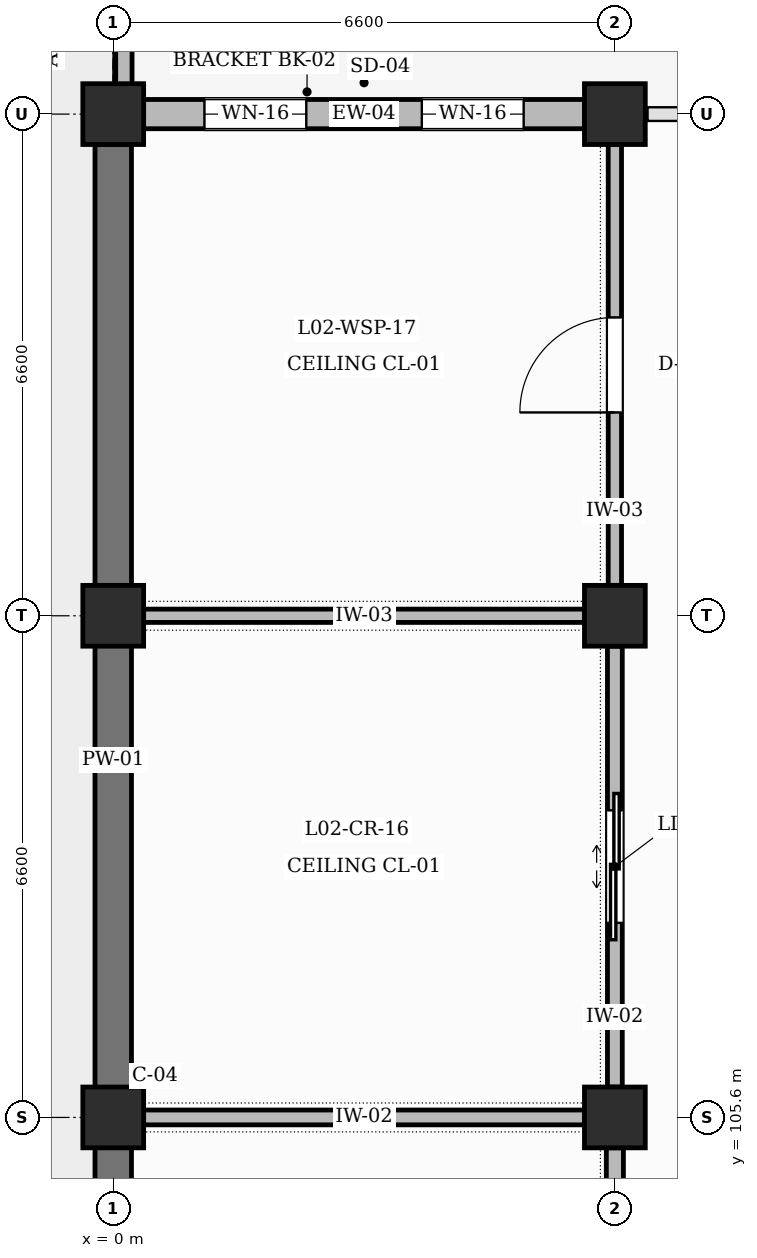
"""IFC4 building model, lengths in metres.
Left out: names, types, materials, properties, quantities, classifications, styles, units other than length and angle.
Written with IfcOpenShell. Run it as: python <this file> out.ifc"""

import sys

from ifc_helpers import new_model, si_unit, direction, frame, frame_2d, origin, origin_2d, place, context, subcontext, project, spatial, rectangle, extrude, element, fill, save


model = new_model("IFC4")
c1 = context("Model", 3, precision=1e-05, world=origin(), true_north=direction((0.0, 1.0)))
c2 = subcontext(c1, "Body", "Model", "MODEL_VIEW")
j1 = project(units=[si_unit("LENGTHUNIT", "METRE"), si_unit("PLANEANGLEUNIT", "RADIAN")], contexts=[c1])
p1 = place(None, origin())
s1 = spatial("IfcSite", under=j1, at=p1, CompositionType="ELEMENT")
p2 = place(p1, origin())
s2 = spatial("IfcBuilding", under=s1, at=p2, CompositionType="ELEMENT")
p3 = place(p2, frame((0.0, 0.0, 10.2)))
s3 = spatial("IfcBuildingStorey", under=s2, at=p3, CompositionType="ELEMENT", Elevation=10.2)
for number, where, z_axis, x_axis in (
    (1, (0.0, 105.6, 0.0), (0.0, 0.0, 1.0), (1.0, 0.0, 0.0)),
    (2, (0.0, 112.2, 0.0), (0.0, 0.0, 1.0), (1.0, 0.0, 0.0)),
    (3, (0.0, 118.8, 0.0), (0.0, 0.0, 1.0), (1.0, 0.0, 0.0)),
    (4, (6.6, 105.6, 0.0), (0.0, 0.0, 1.0), (1.0, 0.0, 0.0)),
    (5, (6.6, 112.2, 0.0), (0.0, 0.0, 1.0), (1.0, 0.0, 0.0)),
    (6, (6.6, 118.8, 0.0), (0.0, 0.0, 1.0), (1.0, 0.0, 0.0)),
):
    element("IfcColumn", number, at=place(p3, frame(where, z_axis=z_axis, x_axis=x_axis)), inside=s3, PredefinedType="COLUMN", context=c2, shape_type="SweptSolid", body=[
        extrude(rectangle(XDim=0.8, YDim=0.8, at=origin_2d()), origin(), (0.0, 0.0, 1.0), 4.2),
    ])
for number, where, z_axis, x_axis in (
    (7, (0.0, 99.4, 0.0), (0.0, 0.0, 1.0), (0.0, 1.0, 0.0)),
    (8, (0.0, 106.0, 0.0), (0.0, 0.0, 1.0), (0.0, 1.0, 0.0)),
):
    element("IfcWall", number, at=place(p3, frame(where, z_axis=z_axis, x_axis=x_axis)), inside=s3, PredefinedType="SOLIDWALL", context=c2, shape_type="SweptSolid", body=[
        extrude(rectangle(XDim=5.8, YDim=0.48, at=frame_2d((2.9, 0.0))), origin(), (0.0, 0.0, 1.0), 3.25),
    ])
p4 = place(p3, frame((0.4, 118.8, 0.0), z_axis=(0.0, 0.0, 1.0), x_axis=(1.0, 0.0, 0.0)))
e9 = element("IfcWall", 9, at=p4, inside=s3, PredefinedType="SOLIDWALL", context=c2, shape_type="SweptSolid", body=[
    extrude(rectangle(XDim=5.8, YDim=0.385, at=frame_2d((2.9, 0.0))), origin(), (0.0, 0.0, 1.0), 3.25),
])
p5 = place(p4, frame((0.8, 0.0, 0.95)))
e10 = element("IfcOpeningElement", 10, at=p5, cuts=e9, PredefinedType="OPENING", context=c2, shape_type="SweptSolid", body=[
    extrude(rectangle(XDim=1.34, YDim=1.96, at=frame_2d((0.67, 0.98))), frame((0.0, 0.202, 0.0), z_axis=(0.0, -1.0, 0.0), x_axis=(1.0, 0.0, 0.0)), (0.0, 0.0, 1.0), 0.405),
])
p6 = place(p4, frame((3.66, 0.0, 0.95)))
e11 = element("IfcOpeningElement", 11, at=p6, cuts=e9, PredefinedType="OPENING", context=c2, shape_type="SweptSolid", body=[
    extrude(rectangle(XDim=1.34, YDim=1.96, at=frame_2d((0.67, 0.98))), frame((0.0, 0.202, 0.0), z_axis=(0.0, -1.0, 0.0), x_axis=(1.0, 0.0, 0.0)), (0.0, 0.0, 1.0), 0.405),
])
p7 = place(p3, frame((0.0, 112.6, 0.0), z_axis=(0.0, 0.0, 1.0), x_axis=(0.0, 1.0, 0.0)))
e12 = element("IfcWall", 12, at=p7, inside=s3, PredefinedType="SOLIDWALL", context=c2, shape_type="SweptSolid", body=[
    extrude(rectangle(XDim=5.8, YDim=0.48, at=frame_2d((2.9, 0.0))), origin(), (0.0, 0.0, 1.0), 3.25),
])
p8 = place(p3, frame((0.14, 119.1, 0.0), z_axis=(0.0, 0.0, 1.0), x_axis=(0.0, 1.0, 0.0)))
e13 = element("IfcWall", 13, at=p8, inside=s3, PredefinedType="PARAPET", context=c2, shape_type="SweptSolid", body=[
    extrude(rectangle(XDim=6.0, YDim=0.215, at=frame_2d((3.0, 0.0))), origin(), (0.0, 0.0, 1.0), 1.15),
])
p9 = place(p3, frame((6.6, 99.4, 0.0), z_axis=(0.0, 0.0, 1.0), x_axis=(0.0, 1.0, 0.0)))
e14 = element("IfcWall", 14, at=p9, inside=s3, PredefinedType="PARTITIONING", context=c2, shape_type="SweptSolid", body=[
    extrude(rectangle(XDim=5.8, YDim=0.225, at=frame_2d((2.9, 0.0))), origin(), (0.0, 0.0, 1.0), 3.1),
])
p10 = place(p9, frame((2.24, 0.0, 0.0)))
e15 = element("IfcOpeningElement", 15, at=p10, cuts=e14, PredefinedType="OPENING", context=c2, shape_type="SweptSolid", body=[
    extrude(rectangle(XDim=1.32, YDim=2.2, at=frame_2d((0.66, 1.1))), frame((0.0, 0.123, 0.0), z_axis=(0.0, -1.0, 0.0), x_axis=(1.0, 0.0, 0.0)), (0.0, 0.0, 1.0), 0.245),
])
p11 = place(p3, frame((0.4, 105.6, 0.0), z_axis=(0.0, 0.0, 1.0), x_axis=(1.0, 0.0, 0.0)))
e16 = element("IfcWall", 16, at=p11, inside=s3, PredefinedType="PARTITIONING", context=c2, shape_type="SweptSolid", body=[
    extrude(rectangle(XDim=5.8, YDim=0.195, at=frame_2d((2.9, 0.0))), origin(), (0.0, 0.0, 1.0), 3.0),
])
p12 = place(p3, frame((6.6, 106.0, 0.0), z_axis=(0.0, 0.0, 1.0), x_axis=(0.0, 1.0, 0.0)))
e17 = element("IfcWall", 17, at=p12, inside=s3, PredefinedType="PARTITIONING", context=c2, shape_type="SweptSolid", body=[
    extrude(rectangle(XDim=5.8, YDim=0.195, at=frame_2d((2.9, 0.0))), origin(), (0.0, 0.0, 1.0), 3.1),
])
p13 = place(p12, frame((2.16, 0.0, 0.0)))
e18 = element("IfcOpeningElement", 18, at=p13, cuts=e17, PredefinedType="OPENING", context=c2, shape_type="SweptSolid", body=[
    extrude(rectangle(XDim=1.48, YDim=2.25, at=frame_2d((0.74, 1.125))), frame((0.0, 0.107, 0.0), z_axis=(0.0, -1.0, 0.0), x_axis=(1.0, 0.0, 0.0)), (0.0, 0.0, 1.0), 0.215),
])
p14 = place(p3, frame((0.4, 112.2, 0.0), z_axis=(0.0, 0.0, 1.0), x_axis=(1.0, 0.0, 0.0)))
e19 = element("IfcWall", 19, at=p14, inside=s3, PredefinedType="PARTITIONING", context=c2, shape_type="SweptSolid", body=[
    extrude(rectangle(XDim=5.8, YDim=0.175, at=frame_2d((2.9, 0.0))), origin(), (0.0, 0.0, 1.0), 3.1),
])
p15 = place(p3, frame((6.6, 112.6, 0.0), z_axis=(0.0, 0.0, 1.0), x_axis=(0.0, 1.0, 0.0)))
e20 = element("IfcWall", 20, at=p15, inside=s3, PredefinedType="PARTITIONING", context=c2, shape_type="SweptSolid", body=[
    extrude(rectangle(XDim=5.8, YDim=0.175, at=frame_2d((2.9, 0.0))), origin(), (0.0, 0.0, 1.0), 3.1),
])
p16 = place(p15, frame((2.275, 0.0, 0.0)))
e21 = element("IfcOpeningElement", 21, at=p16, cuts=e20, PredefinedType="OPENING", context=c2, shape_type="SweptSolid", body=[
    extrude(rectangle(XDim=1.25, YDim=2.25, at=frame_2d((0.625, 1.125))), frame((0.0, 0.097, 0.0), z_axis=(0.0, -1.0, 0.0), x_axis=(1.0, 0.0, 0.0)), (0.0, 0.0, 1.0), 0.195),
])
p17 = place(p5, origin())
e22 = element("IfcWindow", 22, at=p17, inside=s3, PartitioningType="SINGLE_PANEL", PredefinedType="WINDOW", context=c2, shape_type="SweptSolid", body=[
    extrude(rectangle(XDim=1.34, YDim=1.96, at=frame_2d((0.67, 0.98))), frame((0.0, 0.03, 0.0), z_axis=(0.0, -1.0, 0.0), x_axis=(1.0, 0.0, 0.0)), (0.0, 0.0, 1.0), 0.06),
])
fill(e10, e22)
p18 = place(p6, origin())
e23 = element("IfcWindow", 23, at=p18, inside=s3, PartitioningType="SINGLE_PANEL", PredefinedType="WINDOW", context=c2, shape_type="SweptSolid", body=[
    extrude(rectangle(XDim=1.34, YDim=1.96, at=frame_2d((0.67, 0.98))), frame((0.0, 0.03, 0.0), z_axis=(0.0, -1.0, 0.0), x_axis=(1.0, 0.0, 0.0)), (0.0, 0.0, 1.0), 0.06),
])
fill(e11, e23)
p19 = place(p13, origin())
e24 = element("IfcDoor", 24, at=p19, inside=s3, OperationType="DOUBLE_DOOR_SLIDING", PredefinedType="USERDEFINED", context=c2, shape_type="SweptSolid", body=[
    extrude(rectangle(XDim=1.48, YDim=2.25, at=frame_2d((0.74, 1.125))), frame((0.0, 0.025, 0.0), z_axis=(0.0, -1.0, 0.0), x_axis=(1.0, 0.0, 0.0)), (0.0, 0.0, 1.0), 0.05),
])
fill(e18, e24)
p20 = place(p16, origin())
e25 = element("IfcDoor", 25, at=p20, inside=s3, OperationType="SINGLE_SWING_LEFT", PredefinedType="DOOR", context=c2, shape_type="SweptSolid", body=[
    extrude(rectangle(XDim=1.25, YDim=2.25, at=frame_2d((0.625, 1.125))), frame((0.0, 0.025, 0.0), z_axis=(0.0, -1.0, 0.0), x_axis=(1.0, 0.0, 0.0)), (0.0, 0.0, 1.0), 0.05),
])
fill(e21, e25)
save(model, sys.argv[1])
